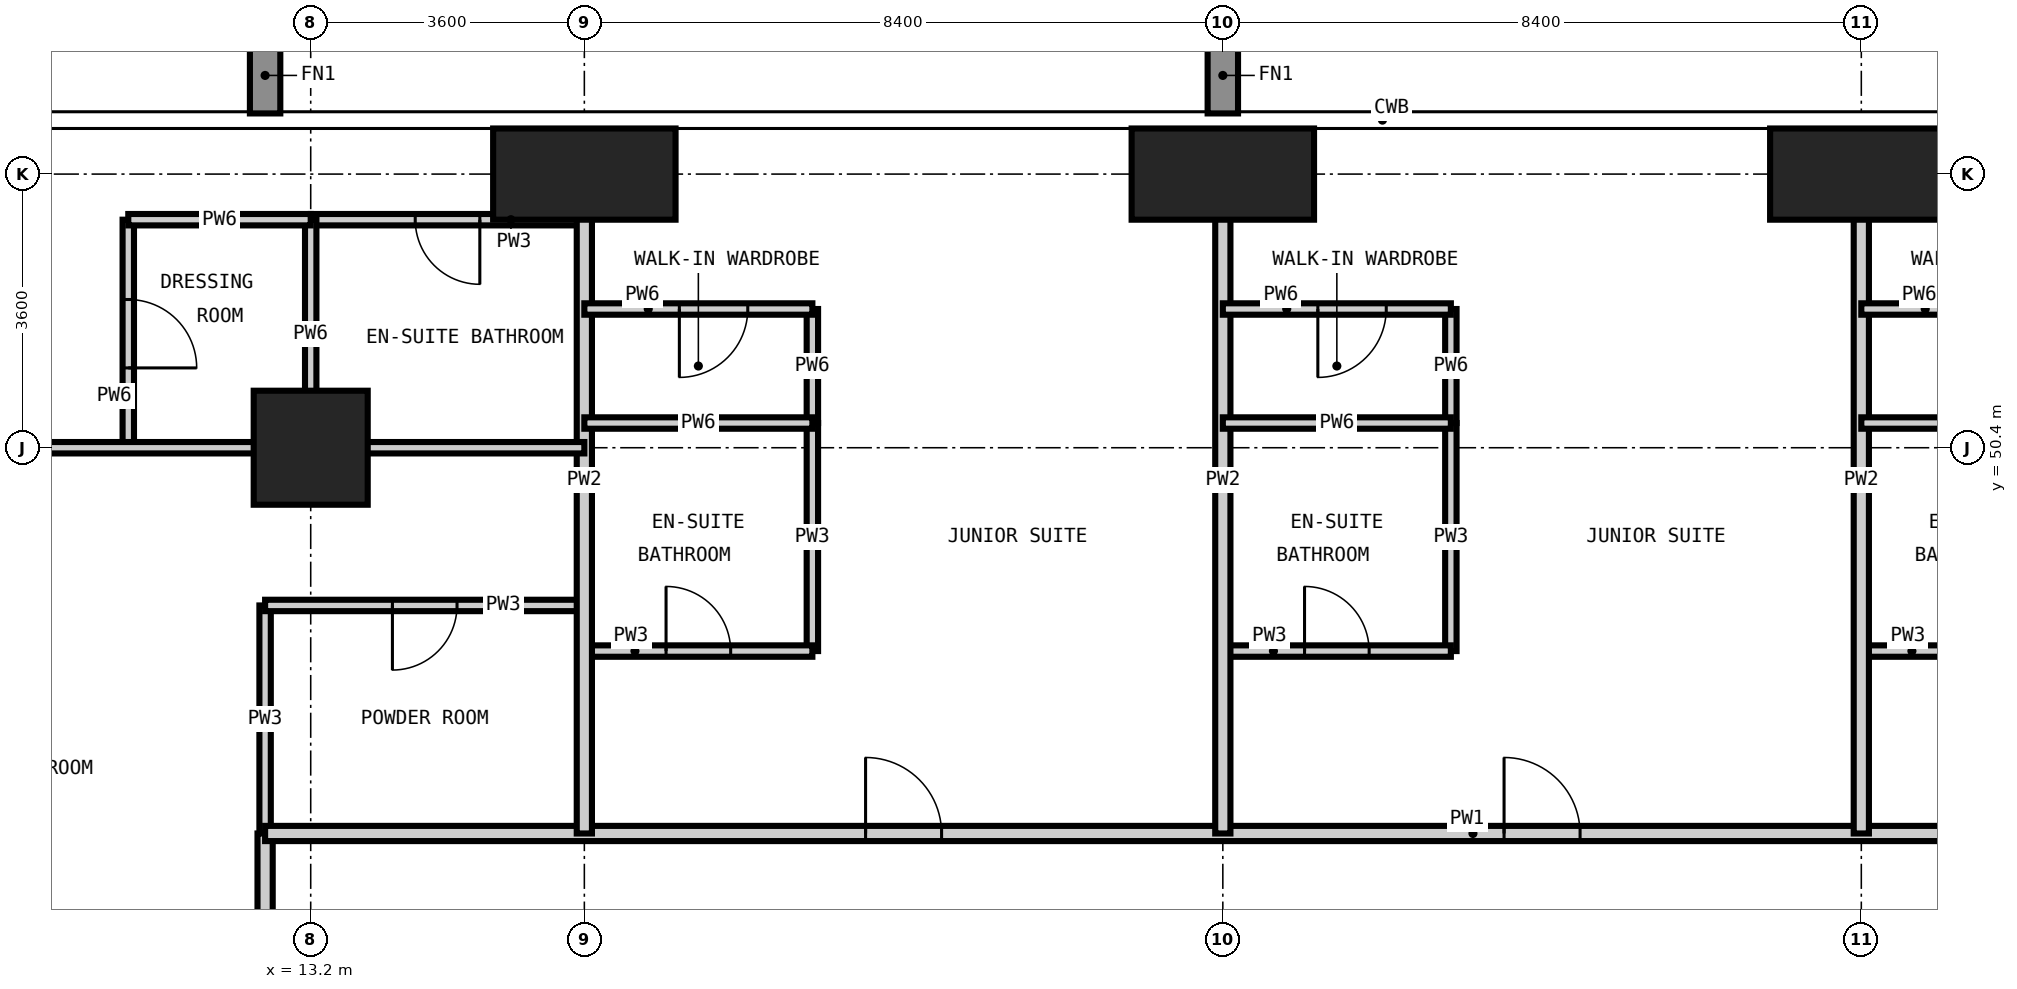
"""IFC4 building model, lengths in metres.
Left out: names, types, materials, properties, quantities, classifications, styles, units other than length and angle.
Written with IfcOpenShell. Run it as: python <this file> out.ifc"""

import sys

from ifc_helpers import new_model, si_unit, direction, frame, frame_2d, origin, origin_2d, place, context, subcontext, project, spatial, rectangle, extrude, element, fill, save


model = new_model("IFC4")
c1 = context("Model", 3, precision=1e-05, world=origin(), true_north=direction((0.0, 1.0)))
c2 = subcontext(c1, "Body", "Model", "MODEL_VIEW")
j1 = project(units=[si_unit("LENGTHUNIT", "METRE"), si_unit("PLANEANGLEUNIT", "RADIAN")], contexts=[c1])
p1 = place(None, origin())
s1 = spatial("IfcSite", under=j1, at=p1, CompositionType="ELEMENT")
p2 = place(p1, origin())
s2 = spatial("IfcBuilding", under=s1, at=p2, CompositionType="ELEMENT")
p3 = place(p2, frame((0.0, 0.0, 100.8)))
s3 = spatial("IfcBuildingStorey", under=s2, at=p3, CompositionType="ELEMENT", Elevation=100.8)
p4 = place(p3, frame((13.2, 50.4, -0.35), z_axis=(0.0, 0.0, 1.0), x_axis=(1.0, 0.0, 0.0)))
e1 = element("IfcColumn", 1, at=p4, inside=s3, PredefinedType="COLUMN", context=c2, shape_type="SweptSolid", body=[
    extrude(rectangle(XDim=1.5, YDim=1.5, at=origin_2d()), origin(), (0.0, 0.0, 1.0), 3.6),
])
for number, where, z_axis, x_axis in (
    (2, (16.8, 54.0, -0.35), (0.0, 0.0, 1.0), (1.0, 0.0, 0.0)),
    (3, (25.2, 54.0, -0.35), (0.0, 0.0, 1.0), (1.0, 0.0, 0.0)),
    (4, (33.6, 54.0, -0.35), (0.0, 0.0, 1.0), (1.0, 0.0, 0.0)),
):
    element("IfcColumn", number, at=place(p3, frame(where, z_axis=z_axis, x_axis=x_axis)), inside=s3, PredefinedType="COLUMN", context=c2, shape_type="SweptSolid", body=[
        extrude(rectangle(XDim=2.4, YDim=1.2, at=origin_2d()), origin(), (0.0, 0.0, 1.0), 3.6),
    ])
for number, where, z_axis, x_axis in (
    (5, (12.6, 45.325, 0.0), (0.0, 0.0, 1.0), (0.0, 1.0, 0.0)),
    (6, (19.8, 47.725, 0.0), (0.0, 0.0, 1.0), (0.0, 1.0, 0.0)),
    (7, (28.2, 47.725, 0.0), (0.0, 0.0, 1.0), (0.0, 1.0, 0.0)),
):
    element("IfcWall", number, at=place(p3, frame(where, z_axis=z_axis, x_axis=x_axis)), inside=s3, PredefinedType="PARTITIONING", context=c2, shape_type="SweptSolid", body=[
        extrude(rectangle(XDim=3.0, YDim=0.15, at=frame_2d((1.5, 0.0))), origin(), (0.0, 0.0, 1.0), 3.25),
    ])
p5 = place(p3, frame((16.8, 47.725, 0.0), z_axis=(0.0, 0.0, 1.0), x_axis=(1.0, 0.0, 0.0)))
e8 = element("IfcWall", 8, at=p5, inside=s3, PredefinedType="PARTITIONING", context=c2, shape_type="SweptSolid", body=[
    extrude(rectangle(XDim=3.0, YDim=0.15, at=frame_2d((1.5, 0.0))), origin(), (0.0, 0.0, 1.0), 3.25),
])
p6 = place(p5, frame((1.075, 0.0, 0.0)))
e9 = element("IfcOpeningElement", 9, at=p6, cuts=e8, PredefinedType="OPENING", context=c2, shape_type="SweptSolid", body=[
    extrude(rectangle(XDim=0.85, YDim=2.1, at=frame_2d((0.425, 1.05))), frame((0.0, 0.085, 0.0), z_axis=(0.0, -1.0, 0.0), x_axis=(1.0, 0.0, 0.0)), (0.0, 0.0, 1.0), 0.17),
])
p7 = place(p3, frame((25.2, 47.725, 0.0), z_axis=(0.0, 0.0, 1.0), x_axis=(1.0, 0.0, 0.0)))
e10 = element("IfcWall", 10, at=p7, inside=s3, PredefinedType="PARTITIONING", context=c2, shape_type="SweptSolid", body=[
    extrude(rectangle(XDim=3.0, YDim=0.15, at=frame_2d((1.5, 0.0))), origin(), (0.0, 0.0, 1.0), 3.25),
])
p8 = place(p7, frame((1.075, 0.0, 0.0)))
e11 = element("IfcOpeningElement", 11, at=p8, cuts=e10, PredefinedType="OPENING", context=c2, shape_type="SweptSolid", body=[
    extrude(rectangle(XDim=0.85, YDim=2.1, at=frame_2d((0.425, 1.05))), frame((0.0, 0.085, 0.0), z_axis=(0.0, -1.0, 0.0), x_axis=(1.0, 0.0, 0.0)), (0.0, 0.0, 1.0), 0.17),
])
p9 = place(p3, frame((33.6, 47.725, 0.0), z_axis=(0.0, 0.0, 1.0), x_axis=(1.0, 0.0, 0.0)))
e12 = element("IfcWall", 12, at=p9, inside=s3, PredefinedType="PARTITIONING", context=c2, shape_type="SweptSolid", body=[
    extrude(rectangle(XDim=3.0, YDim=0.15, at=frame_2d((1.5, 0.0))), origin(), (0.0, 0.0, 1.0), 3.25),
])
p10 = place(p9, frame((1.075, 0.0, 0.0)))
e13 = element("IfcOpeningElement", 13, at=p10, cuts=e12, PredefinedType="OPENING", context=c2, shape_type="SweptSolid", body=[
    extrude(rectangle(XDim=0.85, YDim=2.1, at=frame_2d((0.425, 1.05))), frame((0.0, 0.085, 0.0), z_axis=(0.0, -1.0, 0.0), x_axis=(1.0, 0.0, 0.0)), (0.0, 0.0, 1.0), 0.17),
])
p11 = place(p3, frame((12.6, 48.325, 0.0), z_axis=(0.0, 0.0, 1.0), x_axis=(1.0, 0.0, 0.0)))
e14 = element("IfcWall", 14, at=p11, inside=s3, PredefinedType="PARTITIONING", context=c2, shape_type="SweptSolid", body=[
    extrude(rectangle(XDim=4.2, YDim=0.15, at=frame_2d((2.1, 0.0))), origin(), (0.0, 0.0, 1.0), 3.25),
])
p12 = place(p11, frame((1.675, 0.0, 0.0)))
e15 = element("IfcOpeningElement", 15, at=p12, cuts=e14, PredefinedType="OPENING", context=c2, shape_type="SweptSolid", body=[
    extrude(rectangle(XDim=0.85, YDim=2.1, at=frame_2d((0.425, 1.05))), frame((0.0, 0.085, 0.0), z_axis=(0.0, -1.0, 0.0), x_axis=(1.0, 0.0, 0.0)), (0.0, 0.0, 1.0), 0.17),
])
p13 = place(p3, frame((13.2, 53.4, 0.0), z_axis=(0.0, 0.0, 1.0), x_axis=(1.0, 0.0, 0.0)))
e16 = element("IfcWall", 16, at=p13, inside=s3, PredefinedType="PARTITIONING", context=c2, shape_type="SweptSolid", body=[
    extrude(rectangle(XDim=3.6, YDim=0.15, at=frame_2d((1.8, 0.0))), origin(), (0.0, 0.0, 1.0), 3.25),
])
p14 = place(p13, frame((1.375, 0.0, 0.0)))
e17 = element("IfcOpeningElement", 17, at=p14, cuts=e16, PredefinedType="OPENING", context=c2, shape_type="SweptSolid", body=[
    extrude(rectangle(XDim=0.85, YDim=2.1, at=frame_2d((0.425, 1.05))), frame((0.0, 0.085, 0.0), z_axis=(0.0, -1.0, 0.0), x_axis=(1.0, 0.0, 0.0)), (0.0, 0.0, 1.0), 0.17),
])
p15 = place(p3, frame((12.6, 14.075, 0.0), z_axis=(0.0, 0.0, 1.0), x_axis=(0.0, 1.0, 0.0)))
e18 = element("IfcWall", 18, at=p15, inside=s3, PredefinedType="PARTITIONING", context=c2, shape_type="SweptSolid", body=[
    extrude(rectangle(XDim=31.25, YDim=0.2, at=frame_2d((15.625, 0.0))), origin(), (0.0, 0.0, 1.0), 3.25),
])
p16 = place(p15, frame((5.225, 0.0, 0.0)))
e19 = element("IfcOpeningElement", 19, at=p16, cuts=e18, PredefinedType="OPENING", context=c2, shape_type="SweptSolid", body=[
    extrude(rectangle(XDim=1.0, YDim=2.2, at=frame_2d((0.5, 1.1))), frame((0.0, 0.11, 0.0), z_axis=(0.0, -1.0, 0.0), x_axis=(1.0, 0.0, 0.0)), (0.0, 0.0, 1.0), 0.22),
])
p17 = place(p15, frame((13.625, 0.0, 0.0)))
e20 = element("IfcOpeningElement", 20, at=p17, cuts=e18, PredefinedType="OPENING", context=c2, shape_type="SweptSolid", body=[
    extrude(rectangle(XDim=1.0, YDim=2.2, at=frame_2d((0.5, 1.1))), frame((0.0, 0.11, 0.0), z_axis=(0.0, -1.0, 0.0), x_axis=(1.0, 0.0, 0.0)), (0.0, 0.0, 1.0), 0.22),
])
p18 = place(p15, frame((22.025, 0.0, 0.0)))
e21 = element("IfcOpeningElement", 21, at=p18, cuts=e18, PredefinedType="OPENING", context=c2, shape_type="SweptSolid", body=[
    extrude(rectangle(XDim=1.0, YDim=2.2, at=frame_2d((0.5, 1.1))), frame((0.0, 0.11, 0.0), z_axis=(0.0, -1.0, 0.0), x_axis=(1.0, 0.0, 0.0)), (0.0, 0.0, 1.0), 0.22),
])
p19 = place(p15, frame((0.863, 0.0, 0.0)))
e22 = element("IfcOpeningElement", 22, at=p19, cuts=e18, PredefinedType="OPENING", context=c2, shape_type="SweptSolid", body=[
    extrude(rectangle(XDim=1.0, YDim=2.2, at=frame_2d((0.5, 1.1))), frame((0.0, 0.11, 0.0), z_axis=(0.0, -1.0, 0.0), x_axis=(1.0, 0.0, 0.0)), (0.0, 0.0, 1.0), 0.22),
])
p20 = place(p15, frame((29.088, 0.0, 0.0)))
e23 = element("IfcOpeningElement", 23, at=p20, cuts=e18, PredefinedType="OPENING", context=c2, shape_type="SweptSolid", body=[
    extrude(rectangle(XDim=1.0, YDim=2.2, at=frame_2d((0.5, 1.1))), frame((0.0, 0.11, 0.0), z_axis=(0.0, -1.0, 0.0), x_axis=(1.0, 0.0, 0.0)), (0.0, 0.0, 1.0), 0.22),
])
p21 = place(p3, frame((12.6, 45.325, 0.0), z_axis=(0.0, 0.0, 1.0), x_axis=(1.0, 0.0, 0.0)))
e24 = element("IfcWall", 24, at=p21, inside=s3, PredefinedType="PARTITIONING", context=c2, shape_type="SweptSolid", body=[
    extrude(rectangle(XDim=33.325, YDim=0.2, at=frame_2d((16.663, 0.0))), origin(), (0.0, 0.0, 1.0), 3.25),
])
p22 = place(p21, frame((7.9, 0.0, 0.0)))
e25 = element("IfcOpeningElement", 25, at=p22, cuts=e24, PredefinedType="OPENING", context=c2, shape_type="SweptSolid", body=[
    extrude(rectangle(XDim=1.0, YDim=2.2, at=frame_2d((0.5, 1.1))), frame((0.0, 0.11, 0.0), z_axis=(0.0, -1.0, 0.0), x_axis=(1.0, 0.0, 0.0)), (0.0, 0.0, 1.0), 0.22),
])
p23 = place(p21, frame((16.3, 0.0, 0.0)))
e26 = element("IfcOpeningElement", 26, at=p23, cuts=e24, PredefinedType="OPENING", context=c2, shape_type="SweptSolid", body=[
    extrude(rectangle(XDim=1.0, YDim=2.2, at=frame_2d((0.5, 1.1))), frame((0.0, 0.11, 0.0), z_axis=(0.0, -1.0, 0.0), x_axis=(1.0, 0.0, 0.0)), (0.0, 0.0, 1.0), 0.22),
])
p24 = place(p21, frame((24.7, 0.0, 0.0)))
e27 = element("IfcOpeningElement", 27, at=p24, cuts=e24, PredefinedType="OPENING", context=c2, shape_type="SweptSolid", body=[
    extrude(rectangle(XDim=1.0, YDim=2.2, at=frame_2d((0.5, 1.1))), frame((0.0, 0.11, 0.0), z_axis=(0.0, -1.0, 0.0), x_axis=(1.0, 0.0, 0.0)), (0.0, 0.0, 1.0), 0.22),
])
for number, where, z_axis, x_axis in (
    (28, (16.8, 45.325, 0.0), (0.0, 0.0, 1.0), (0.0, 1.0, 0.0)),
    (29, (25.2, 45.325, 0.0), (0.0, 0.0, 1.0), (0.0, 1.0, 0.0)),
    (30, (33.6, 45.325, 0.0), (0.0, 0.0, 1.0), (0.0, 1.0, 0.0)),
):
    element("IfcWall", number, at=place(p3, frame(where, z_axis=z_axis, x_axis=x_axis)), inside=s3, PredefinedType="PARTITIONING", context=c2, shape_type="SweptSolid", body=[
        extrude(rectangle(XDim=9.293, YDim=0.2, at=frame_2d((4.646, 0.0))), origin(), (0.0, 0.0, 1.0), 3.25),
    ])
p25 = place(p3, frame((10.8, 50.4, 0.0), z_axis=(0.0, 0.0, 1.0), x_axis=(0.0, 1.0, 0.0)))
e31 = element("IfcWall", 31, at=p25, inside=s3, PredefinedType="PARTITIONING", context=c2, shape_type="SweptSolid", body=[
    extrude(rectangle(XDim=3.0, YDim=0.15, at=frame_2d((1.5, 0.0))), origin(), (0.0, 0.0, 1.0), 3.25),
])
p26 = place(p25, frame((1.05, 0.0, 0.0)))
e32 = element("IfcOpeningElement", 32, at=p26, cuts=e31, PredefinedType="OPENING", context=c2, shape_type="SweptSolid", body=[
    extrude(rectangle(XDim=0.9, YDim=2.1, at=frame_2d((0.45, 1.05))), frame((0.0, 0.085, 0.0), z_axis=(0.0, -1.0, 0.0), x_axis=(1.0, 0.0, 0.0)), (0.0, 0.0, 1.0), 0.17),
])
p27 = place(p3, frame((13.2, 50.4, 0.0), z_axis=(0.0, 0.0, 1.0), x_axis=(0.0, 1.0, 0.0)))
e33 = element("IfcWall", 33, at=p27, inside=s3, PredefinedType="PARTITIONING", context=c2, shape_type="SweptSolid", body=[
    extrude(rectangle(XDim=3.0, YDim=0.15, at=frame_2d((1.5, 0.0))), origin(), (0.0, 0.0, 1.0), 3.25),
])
for number, where, z_axis, x_axis in (
    (34, (19.8, 50.725, 0.0), (0.0, 0.0, 1.0), (0.0, 1.0, 0.0)),
    (35, (28.2, 50.725, 0.0), (0.0, 0.0, 1.0), (0.0, 1.0, 0.0)),
):
    element("IfcWall", number, at=place(p3, frame(where, z_axis=z_axis, x_axis=x_axis)), inside=s3, PredefinedType="PARTITIONING", context=c2, shape_type="SweptSolid", body=[
        extrude(rectangle(XDim=1.5, YDim=0.15, at=frame_2d((0.75, 0.0))), origin(), (0.0, 0.0, 1.0), 3.25),
    ])
p28 = place(p3, frame((-0.018, 50.4, 0.0), z_axis=(0.0, 0.0, 1.0), x_axis=(1.0, 0.0, 0.0)))
e36 = element("IfcWall", 36, at=p28, inside=s3, PredefinedType="PARTITIONING", context=c2, shape_type="SweptSolid", body=[
    extrude(rectangle(XDim=16.818, YDim=0.15, at=frame_2d((8.409, 0.0))), origin(), (0.0, 0.0, 1.0), 3.25),
])
p29 = place(p28, frame((5.668, 0.0, 0.0)))
e37 = element("IfcOpeningElement", 37, at=p29, cuts=e36, PredefinedType="OPENING", context=c2, shape_type="SweptSolid", body=[
    extrude(rectangle(XDim=0.9, YDim=2.1, at=frame_2d((0.45, 1.05))), frame((0.0, 0.085, 0.0), z_axis=(0.0, -1.0, 0.0), x_axis=(1.0, 0.0, 0.0)), (0.0, 0.0, 1.0), 0.17),
])
for number, where, z_axis, x_axis in (
    (38, (16.8, 50.725, 0.0), (0.0, 0.0, 1.0), (1.0, 0.0, 0.0)),
    (39, (25.2, 50.725, 0.0), (0.0, 0.0, 1.0), (1.0, 0.0, 0.0)),
    (40, (33.6, 50.725, 0.0), (0.0, 0.0, 1.0), (1.0, 0.0, 0.0)),
):
    element("IfcWall", number, at=place(p3, frame(where, z_axis=z_axis, x_axis=x_axis)), inside=s3, PredefinedType="PARTITIONING", context=c2, shape_type="SweptSolid", body=[
        extrude(rectangle(XDim=3.0, YDim=0.15, at=frame_2d((1.5, 0.0))), origin(), (0.0, 0.0, 1.0), 3.25),
    ])
p30 = place(p3, frame((16.8, 52.225, 0.0), z_axis=(0.0, 0.0, 1.0), x_axis=(1.0, 0.0, 0.0)))
e41 = element("IfcWall", 41, at=p30, inside=s3, PredefinedType="PARTITIONING", context=c2, shape_type="SweptSolid", body=[
    extrude(rectangle(XDim=3.0, YDim=0.15, at=frame_2d((1.5, 0.0))), origin(), (0.0, 0.0, 1.0), 3.25),
])
p31 = place(p30, frame((1.25, 0.0, 0.0)))
e42 = element("IfcOpeningElement", 42, at=p31, cuts=e41, PredefinedType="OPENING", context=c2, shape_type="SweptSolid", body=[
    extrude(rectangle(XDim=0.9, YDim=2.1, at=frame_2d((0.45, 1.05))), frame((0.0, 0.085, 0.0), z_axis=(0.0, -1.0, 0.0), x_axis=(1.0, 0.0, 0.0)), (0.0, 0.0, 1.0), 0.17),
])
p32 = place(p3, frame((25.2, 52.225, 0.0), z_axis=(0.0, 0.0, 1.0), x_axis=(1.0, 0.0, 0.0)))
e43 = element("IfcWall", 43, at=p32, inside=s3, PredefinedType="PARTITIONING", context=c2, shape_type="SweptSolid", body=[
    extrude(rectangle(XDim=3.0, YDim=0.15, at=frame_2d((1.5, 0.0))), origin(), (0.0, 0.0, 1.0), 3.25),
])
p33 = place(p32, frame((1.25, 0.0, 0.0)))
e44 = element("IfcOpeningElement", 44, at=p33, cuts=e43, PredefinedType="OPENING", context=c2, shape_type="SweptSolid", body=[
    extrude(rectangle(XDim=0.9, YDim=2.1, at=frame_2d((0.45, 1.05))), frame((0.0, 0.085, 0.0), z_axis=(0.0, -1.0, 0.0), x_axis=(1.0, 0.0, 0.0)), (0.0, 0.0, 1.0), 0.17),
])
p34 = place(p3, frame((33.6, 52.225, 0.0), z_axis=(0.0, 0.0, 1.0), x_axis=(1.0, 0.0, 0.0)))
e45 = element("IfcWall", 45, at=p34, inside=s3, PredefinedType="PARTITIONING", context=c2, shape_type="SweptSolid", body=[
    extrude(rectangle(XDim=3.0, YDim=0.15, at=frame_2d((1.5, 0.0))), origin(), (0.0, 0.0, 1.0), 3.25),
])
p35 = place(p34, frame((1.25, 0.0, 0.0)))
e46 = element("IfcOpeningElement", 46, at=p35, cuts=e45, PredefinedType="OPENING", context=c2, shape_type="SweptSolid", body=[
    extrude(rectangle(XDim=0.9, YDim=2.1, at=frame_2d((0.45, 1.05))), frame((0.0, 0.085, 0.0), z_axis=(0.0, -1.0, 0.0), x_axis=(1.0, 0.0, 0.0)), (0.0, 0.0, 1.0), 0.17),
])
p36 = place(p3, frame((10.8, 53.4, 0.0), z_axis=(0.0, 0.0, 1.0), x_axis=(1.0, 0.0, 0.0)))
e47 = element("IfcWall", 47, at=p36, inside=s3, PredefinedType="PARTITIONING", context=c2, shape_type="SweptSolid", body=[
    extrude(rectangle(XDim=2.4, YDim=0.15, at=frame_2d((1.2, 0.0))), origin(), (0.0, 0.0, 1.0), 3.25),
])
p37 = place(p22, origin())
e48 = element("IfcDoor", 48, at=p37, inside=s3, OperationType="SINGLE_SWING_LEFT", PredefinedType="DOOR", context=c2, shape_type="SweptSolid", body=[
    extrude(rectangle(XDim=1.0, YDim=2.2, at=frame_2d((0.5, 1.1))), frame((0.0, 0.025, 0.0), z_axis=(0.0, -1.0, 0.0), x_axis=(1.0, 0.0, 0.0)), (0.0, 0.0, 1.0), 0.05),
])
fill(e25, e48)
p38 = place(p6, origin())
e49 = element("IfcDoor", 49, at=p38, inside=s3, OperationType="SINGLE_SWING_LEFT", PredefinedType="DOOR", context=c2, shape_type="SweptSolid", body=[
    extrude(rectangle(XDim=0.85, YDim=2.1, at=frame_2d((0.425, 1.05))), frame((0.0, 0.025, 0.0), z_axis=(0.0, -1.0, 0.0), x_axis=(1.0, 0.0, 0.0)), (0.0, 0.0, 1.0), 0.05),
])
fill(e9, e49)
p39 = place(p31, frame((0.9, 0.0, 0.0), z_axis=(0.0, 0.0, 1.0), x_axis=(-1.0, 0.0, 0.0)))
e50 = element("IfcDoor", 50, at=p39, inside=s3, OperationType="SINGLE_SWING_RIGHT", PredefinedType="DOOR", context=c2, shape_type="SweptSolid", body=[
    extrude(rectangle(XDim=0.9, YDim=2.1, at=frame_2d((0.45, 1.05))), frame((0.0, 0.025, 0.0), z_axis=(0.0, -1.0, 0.0), x_axis=(1.0, 0.0, 0.0)), (0.0, 0.0, 1.0), 0.05),
])
fill(e42, e50)
p40 = place(p23, origin())
e51 = element("IfcDoor", 51, at=p40, inside=s3, OperationType="SINGLE_SWING_LEFT", PredefinedType="DOOR", context=c2, shape_type="SweptSolid", body=[
    extrude(rectangle(XDim=1.0, YDim=2.2, at=frame_2d((0.5, 1.1))), frame((0.0, 0.025, 0.0), z_axis=(0.0, -1.0, 0.0), x_axis=(1.0, 0.0, 0.0)), (0.0, 0.0, 1.0), 0.05),
])
fill(e26, e51)
p41 = place(p8, origin())
e52 = element("IfcDoor", 52, at=p41, inside=s3, OperationType="SINGLE_SWING_LEFT", PredefinedType="DOOR", context=c2, shape_type="SweptSolid", body=[
    extrude(rectangle(XDim=0.85, YDim=2.1, at=frame_2d((0.425, 1.05))), frame((0.0, 0.025, 0.0), z_axis=(0.0, -1.0, 0.0), x_axis=(1.0, 0.0, 0.0)), (0.0, 0.0, 1.0), 0.05),
])
fill(e11, e52)
p42 = place(p33, frame((0.9, 0.0, 0.0), z_axis=(0.0, 0.0, 1.0), x_axis=(-1.0, 0.0, 0.0)))
e53 = element("IfcDoor", 53, at=p42, inside=s3, OperationType="SINGLE_SWING_RIGHT", PredefinedType="DOOR", context=c2, shape_type="SweptSolid", body=[
    extrude(rectangle(XDim=0.9, YDim=2.1, at=frame_2d((0.45, 1.05))), frame((0.0, 0.025, 0.0), z_axis=(0.0, -1.0, 0.0), x_axis=(1.0, 0.0, 0.0)), (0.0, 0.0, 1.0), 0.05),
])
fill(e44, e53)
p43 = place(p12, frame((0.85, 0.0, 0.0), z_axis=(0.0, 0.0, 1.0), x_axis=(-1.0, 0.0, 0.0)))
e54 = element("IfcDoor", 54, at=p43, inside=s3, OperationType="SINGLE_SWING_RIGHT", PredefinedType="DOOR", context=c2, shape_type="SweptSolid", body=[
    extrude(rectangle(XDim=0.85, YDim=2.1, at=frame_2d((0.425, 1.05))), frame((0.0, 0.025, 0.0), z_axis=(0.0, -1.0, 0.0), x_axis=(1.0, 0.0, 0.0)), (0.0, 0.0, 1.0), 0.05),
])
fill(e15, e54)
p44 = place(p14, frame((0.85, 0.0, 0.0), z_axis=(0.0, 0.0, 1.0), x_axis=(-1.0, 0.0, 0.0)))
e55 = element("IfcDoor", 55, at=p44, inside=s3, OperationType="SINGLE_SWING_LEFT", PredefinedType="DOOR", context=c2, shape_type="SweptSolid", body=[
    extrude(rectangle(XDim=0.85, YDim=2.1, at=frame_2d((0.425, 1.05))), frame((0.0, 0.025, 0.0), z_axis=(0.0, -1.0, 0.0), x_axis=(1.0, 0.0, 0.0)), (0.0, 0.0, 1.0), 0.05),
])
fill(e17, e55)
p45 = place(p26, frame((0.9, 0.0, 0.0), z_axis=(0.0, 0.0, 1.0), x_axis=(-1.0, 0.0, 0.0)))
e56 = element("IfcDoor", 56, at=p45, inside=s3, OperationType="SINGLE_SWING_RIGHT", PredefinedType="DOOR", context=c2, shape_type="SweptSolid", body=[
    extrude(rectangle(XDim=0.9, YDim=2.1, at=frame_2d((0.45, 1.05))), frame((0.0, 0.025, 0.0), z_axis=(0.0, -1.0, 0.0), x_axis=(1.0, 0.0, 0.0)), (0.0, 0.0, 1.0), 0.05),
])
fill(e32, e56)
save(model, sys.argv[1])
